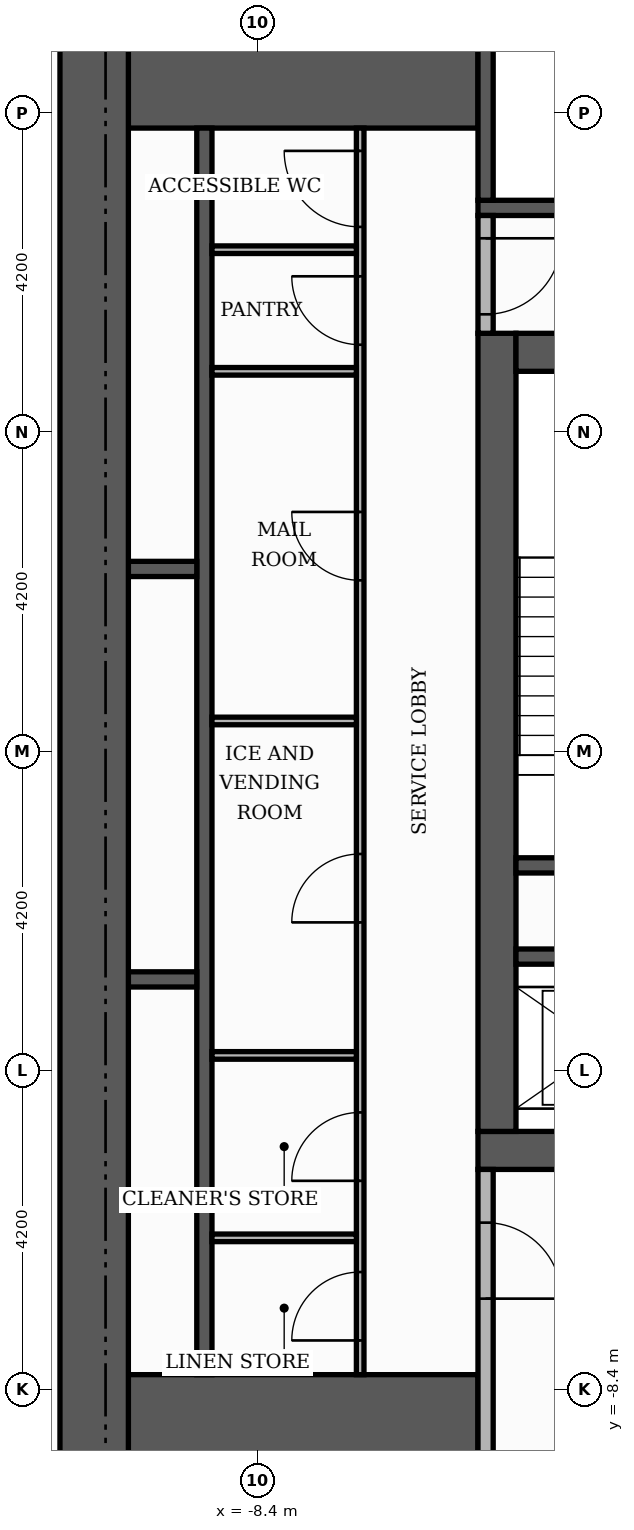
"""IFC4 building model, lengths in metres.
Left out: names, types, materials, properties, quantities, classifications, styles, units other than length and angle.
Written with IfcOpenShell. Run it as: python <this file> out.ifc"""

import sys

from ifc_helpers import new_model, si_unit, direction, frame, frame_2d, origin, place, context, subcontext, project, spatial, rectangle, extrude, element, fill, save


model = new_model("IFC4")
c1 = context("Model", 3, precision=1e-05, world=origin(), true_north=direction((0.0, 1.0)))
c2 = subcontext(c1, "Body", "Model", "MODEL_VIEW")
j1 = project(units=[si_unit("LENGTHUNIT", "METRE"), si_unit("PLANEANGLEUNIT", "RADIAN")], contexts=[c1])
p1 = place(None, origin())
s1 = spatial("IfcSite", under=j1, at=p1, CompositionType="ELEMENT")
p2 = place(p1, origin())
s2 = spatial("IfcBuilding", under=s1, at=p2, CompositionType="ELEMENT")
p3 = place(p2, frame((0.0, 0.0, 188.4)))
s3 = spatial("IfcBuildingStorey", under=s2, at=p3, CompositionType="ELEMENT", Elevation=188.4)
p4 = place(p3, frame((-5.5, -5.25, 0.0), z_axis=(0.0, 0.0, 1.0), x_axis=(1.0, 0.0, 0.0)))
e1 = element("IfcWall", 1, at=p4, inside=s3, PredefinedType="SHEAR", context=c2, shape_type="SweptSolid", body=[
    extrude(rectangle(XDim=11.0, YDim=0.5, at=frame_2d((5.5, 0.0))), origin(), (0.0, 0.0, 1.0), 3.48),
])
p5 = place(p4, frame((4.9, 0.0, 0.0)))
e2 = element("IfcOpeningElement", 2, at=p5, cuts=e1, PredefinedType="OPENING", context=c2, shape_type="SweptSolid", body=[
    extrude(rectangle(XDim=1.2, YDim=2.1, at=frame_2d((0.6, 1.05))), frame((0.0, 0.26, 0.0), z_axis=(0.0, -1.0, 0.0), x_axis=(1.0, 0.0, 0.0)), (0.0, 0.0, 1.0), 0.52),
])
p6 = place(p3, frame((-5.25, -5.0, 0.0), z_axis=(0.0, 0.0, 1.0), x_axis=(0.0, 1.0, 0.0)))
e3 = element("IfcWall", 3, at=p6, inside=s3, PredefinedType="SHEAR", context=c2, shape_type="SweptSolid", body=[
    extrude(rectangle(XDim=10.5, YDim=0.5, at=frame_2d((5.25, 0.0))), origin(), (0.0, 0.0, 1.0), 3.48),
])
p7 = place(p3, frame((-5.0, 5.25, 0.0), z_axis=(0.0, 0.0, 1.0), x_axis=(1.0, 0.0, 0.0)))
e4 = element("IfcWall", 4, at=p7, inside=s3, PredefinedType="SHEAR", context=c2, shape_type="SweptSolid", body=[
    extrude(rectangle(XDim=10.0, YDim=0.5, at=frame_2d((5.0, 0.0))), origin(), (0.0, 0.0, 1.0), 3.48),
])
p8 = place(p7, frame((4.4, 0.0, 0.0)))
e5 = element("IfcOpeningElement", 5, at=p8, cuts=e4, PredefinedType="OPENING", context=c2, shape_type="SweptSolid", body=[
    extrude(rectangle(XDim=1.2, YDim=2.1, at=frame_2d((0.6, 1.05))), frame((0.0, 0.26, 0.0), z_axis=(0.0, -1.0, 0.0), x_axis=(1.0, 0.0, 0.0)), (0.0, 0.0, 1.0), 0.52),
])
for number, where, z_axis, x_axis in (
    (6, (-10.1, -9.15, 0.0), (0.0, 0.0, 1.0), (1.0, 0.0, 0.0)),
    (7, (-10.1, 9.15, 0.0), (0.0, 0.0, 1.0), (1.0, 0.0, 0.0)),
):
    element("IfcWall", number, at=place(p3, frame(where, z_axis=z_axis, x_axis=x_axis)), inside=s3, PredefinedType="SHEAR", context=c2, shape_type="SweptSolid", body=[
        extrude(rectangle(XDim=4.6, YDim=1.9, at=frame_2d((2.3, 0.0))), origin(), (0.0, 0.0, 1.0), 3.48),
    ])
p9 = place(p3, frame((-5.0, -1.5, 0.0), z_axis=(0.0, 0.0, 1.0), x_axis=(1.0, 0.0, 0.0)))
e8 = element("IfcWall", 8, at=p9, inside=s3, PredefinedType="SHEAR", context=c2, shape_type="SweptSolid", body=[
    extrude(rectangle(XDim=3.05, YDim=0.2, at=frame_2d((1.525, 0.0))), origin(), (0.0, 0.0, 1.0), 3.48),
])
p10 = place(p3, frame((-5.5, 7.15, 0.0), z_axis=(0.0, 0.0, 1.0), x_axis=(1.0, 0.0, 0.0)))
e9 = element("IfcWall", 9, at=p10, inside=s3, PredefinedType="SHEAR", context=c2, shape_type="SweptSolid", body=[
    extrude(rectangle(XDim=6.8, YDim=0.2, at=frame_2d((3.4, 0.0))), origin(), (0.0, 0.0, 1.0), 3.48),
])
p11 = place(p3, frame((-5.4, 7.25, 0.0), z_axis=(0.0, 0.0, 1.0), x_axis=(0.0, 1.0, 0.0)))
e10 = element("IfcWall", 10, at=p11, inside=s3, PredefinedType="SHEAR", context=c2, shape_type="SweptSolid", body=[
    extrude(rectangle(XDim=2.85, YDim=0.2, at=frame_2d((1.425, 0.0))), origin(), (0.0, 0.0, 1.0), 3.48),
])
p12 = place(p3, frame((-9.1, -8.2, 0.0), z_axis=(0.0, 0.0, 1.0), x_axis=(0.0, 1.0, 0.0)))
e11 = element("IfcWall", 11, at=p12, inside=s3, PredefinedType="SHEAR", context=c2, shape_type="SweptSolid", body=[
    extrude(rectangle(XDim=16.4, YDim=0.2, at=frame_2d((8.2, 0.0))), origin(), (0.0, 0.0, 1.0), 3.48),
])
p13 = place(p3, frame((-10.1, -3.0, 0.0), z_axis=(0.0, 0.0, 1.0), x_axis=(1.0, 0.0, 0.0)))
e12 = element("IfcWall", 12, at=p13, inside=s3, PredefinedType="SHEAR", context=c2, shape_type="SweptSolid", body=[
    extrude(rectangle(XDim=0.9, YDim=0.2, at=frame_2d((0.45, 0.0))), origin(), (0.0, 0.0, 1.0), 3.48),
])
p14 = place(p3, frame((-5.0, -2.7, 0.0), z_axis=(0.0, 0.0, 1.0), x_axis=(1.0, 0.0, 0.0)))
e13 = element("IfcWall", 13, at=p14, inside=s3, PredefinedType="SHEAR", context=c2, shape_type="SweptSolid", body=[
    extrude(rectangle(XDim=2.85, YDim=0.2, at=frame_2d((1.425, 0.0))), origin(), (0.0, 0.0, 1.0), 3.48),
])
p15 = place(p3, frame((-10.1, 2.4, 0.0), z_axis=(0.0, 0.0, 1.0), x_axis=(1.0, 0.0, 0.0)))
e14 = element("IfcWall", 14, at=p15, inside=s3, PredefinedType="SHEAR", context=c2, shape_type="SweptSolid", body=[
    extrude(rectangle(XDim=0.9, YDim=0.2, at=frame_2d((0.45, 0.0))), origin(), (0.0, 0.0, 1.0), 3.48),
])
p16 = place(p3, frame((-10.55, -10.1, 0.0), z_axis=(0.0, 0.0, 1.0), x_axis=(0.0, 1.0, 0.0)))
e15 = element("IfcWall", 15, at=p16, inside=s3, PredefinedType="SHEAR", context=c2, shape_type="SweptSolid", body=[
    extrude(rectangle(XDim=20.2, YDim=0.9, at=frame_2d((10.1, 0.0))), origin(), (0.0, 0.0, 1.0), 3.48),
])
p17 = place(p3, frame((-5.4, -10.1, 0.0), z_axis=(0.0, 0.0, 1.0), x_axis=(0.0, 1.0, 0.0)))
e16 = element("IfcWall", 16, at=p17, inside=s3, PredefinedType="PARTITIONING", context=c2, shape_type="SweptSolid", body=[
    extrude(rectangle(XDim=4.6, YDim=0.2, at=frame_2d((2.3, 0.0))), origin(), (0.0, 0.0, 1.0), 3.48),
])
p18 = place(p17, frame((2.9, 0.0, 0.0)))
e17 = element("IfcOpeningElement", 17, at=p18, cuts=e16, PredefinedType="OPENING", context=c2, shape_type="SweptSolid", body=[
    extrude(rectangle(XDim=1.0, YDim=2.1, at=frame_2d((0.5, 1.05))), frame((0.0, 0.11, 0.0), z_axis=(0.0, -1.0, 0.0), x_axis=(1.0, 0.0, 0.0)), (0.0, 0.0, 1.0), 0.22),
])
p19 = place(p3, frame((-7.05, -8.2, 0.0), z_axis=(0.0, 0.0, 1.0), x_axis=(0.0, 1.0, 0.0)))
e18 = element("IfcWall", 18, at=p19, inside=s3, PredefinedType="PARTITIONING", context=c2, shape_type="SweptSolid", body=[
    extrude(rectangle(XDim=16.4, YDim=0.1, at=frame_2d((8.2, 0.0))), origin(), (0.0, 0.0, 1.0), 3.48),
])
p20 = place(p19, frame((0.45, 0.0, 0.0)))
e19 = element("IfcOpeningElement", 19, at=p20, cuts=e18, PredefinedType="OPENING", context=c2, shape_type="SweptSolid", body=[
    extrude(rectangle(XDim=0.9, YDim=2.1, at=frame_2d((0.45, 1.05))), frame((0.0, 0.06, 0.0), z_axis=(0.0, -1.0, 0.0), x_axis=(1.0, 0.0, 0.0)), (0.0, 0.0, 1.0), 0.12),
])
p21 = place(p19, frame((2.55, 0.0, 0.0)))
e20 = element("IfcOpeningElement", 20, at=p21, cuts=e18, PredefinedType="OPENING", context=c2, shape_type="SweptSolid", body=[
    extrude(rectangle(XDim=0.9, YDim=2.1, at=frame_2d((0.45, 1.05))), frame((0.0, 0.06, 0.0), z_axis=(0.0, -1.0, 0.0), x_axis=(1.0, 0.0, 0.0)), (0.0, 0.0, 1.0), 0.12),
])
p22 = place(p19, frame((5.95, 0.0, 0.0)))
e21 = element("IfcOpeningElement", 21, at=p22, cuts=e18, PredefinedType="OPENING", context=c2, shape_type="SweptSolid", body=[
    extrude(rectangle(XDim=0.9, YDim=2.1, at=frame_2d((0.45, 1.05))), frame((0.0, 0.06, 0.0), z_axis=(0.0, -1.0, 0.0), x_axis=(1.0, 0.0, 0.0)), (0.0, 0.0, 1.0), 0.12),
])
p23 = place(p19, frame((10.45, 0.0, 0.0)))
e22 = element("IfcOpeningElement", 22, at=p23, cuts=e18, PredefinedType="OPENING", context=c2, shape_type="SweptSolid", body=[
    extrude(rectangle(XDim=0.9, YDim=2.1, at=frame_2d((0.45, 1.05))), frame((0.0, 0.06, 0.0), z_axis=(0.0, -1.0, 0.0), x_axis=(1.0, 0.0, 0.0)), (0.0, 0.0, 1.0), 0.12),
])
p24 = place(p19, frame((13.55, 0.0, 0.0)))
e23 = element("IfcOpeningElement", 23, at=p24, cuts=e18, PredefinedType="OPENING", context=c2, shape_type="SweptSolid", body=[
    extrude(rectangle(XDim=0.9, YDim=2.1, at=frame_2d((0.45, 1.05))), frame((0.0, 0.06, 0.0), z_axis=(0.0, -1.0, 0.0), x_axis=(1.0, 0.0, 0.0)), (0.0, 0.0, 1.0), 0.12),
])
p25 = place(p19, frame((15.1, 0.0, 0.0)))
e24 = element("IfcOpeningElement", 24, at=p25, cuts=e18, PredefinedType="OPENING", context=c2, shape_type="SweptSolid", body=[
    extrude(rectangle(XDim=1.0, YDim=2.1, at=frame_2d((0.5, 1.05))), frame((0.0, 0.06, 0.0), z_axis=(0.0, -1.0, 0.0), x_axis=(1.0, 0.0, 0.0)), (0.0, 0.0, 1.0), 0.12),
])
for number, where, z_axis, x_axis in (
    (25, (-9.0, -6.4, 0.0), (0.0, 0.0, 1.0), (1.0, 0.0, 0.0)),
    (26, (-9.0, -4.0, 0.0), (0.0, 0.0, 1.0), (1.0, 0.0, 0.0)),
    (27, (-9.0, 0.4, 0.0), (0.0, 0.0, 1.0), (1.0, 0.0, 0.0)),
    (28, (-9.0, 5.0, 0.0), (0.0, 0.0, 1.0), (1.0, 0.0, 0.0)),
):
    element("IfcWall", number, at=place(p3, frame(where, z_axis=z_axis, x_axis=x_axis)), inside=s3, PredefinedType="PARTITIONING", context=c2, shape_type="SweptSolid", body=[
        extrude(rectangle(XDim=1.9, YDim=0.1, at=frame_2d((0.95, 0.0))), origin(), (0.0, 0.0, 1.0), 3.48),
    ])
p26 = place(p3, frame((-5.4, 5.5, 0.0), z_axis=(0.0, 0.0, 1.0), x_axis=(0.0, 1.0, 0.0)))
e29 = element("IfcWall", 29, at=p26, inside=s3, PredefinedType="PARTITIONING", context=c2, shape_type="SweptSolid", body=[
    extrude(rectangle(XDim=1.55, YDim=0.2, at=frame_2d((0.775, 0.0))), origin(), (0.0, 0.0, 1.0), 3.48),
])
p27 = place(p26, frame((0.25, 0.0, 0.0)))
e30 = element("IfcOpeningElement", 30, at=p27, cuts=e29, PredefinedType="OPENING", context=c2, shape_type="SweptSolid", body=[
    extrude(rectangle(XDim=1.0, YDim=2.1, at=frame_2d((0.5, 1.05))), frame((0.0, 0.11, 0.0), z_axis=(0.0, -1.0, 0.0), x_axis=(1.0, 0.0, 0.0)), (0.0, 0.0, 1.0), 0.22),
])
p28 = place(p3, frame((-9.0, 6.6, 0.0), z_axis=(0.0, 0.0, 1.0), x_axis=(1.0, 0.0, 0.0)))
e31 = element("IfcWall", 31, at=p28, inside=s3, PredefinedType="PARTITIONING", context=c2, shape_type="SweptSolid", body=[
    extrude(rectangle(XDim=1.9, YDim=0.1, at=frame_2d((0.95, 0.0))), origin(), (0.0, 0.0, 1.0), 3.48),
])
p29 = place(p27, frame((1.0, 0.0, 0.0), z_axis=(0.0, 0.0, 1.0), x_axis=(-1.0, 0.0, 0.0)))
e32 = element("IfcDoor", 32, at=p29, inside=s3, OperationType="SINGLE_SWING_RIGHT", PredefinedType="DOOR", context=c2, shape_type="SweptSolid", body=[
    extrude(rectangle(XDim=1.0, YDim=2.1, at=frame_2d((0.5, 1.05))), frame((0.0, 0.025, 0.0), z_axis=(0.0, -1.0, 0.0), x_axis=(1.0, 0.0, 0.0)), (0.0, 0.0, 1.0), 0.05),
])
fill(e30, e32)
p30 = place(p18, frame((1.0, 0.0, 0.0), z_axis=(0.0, 0.0, 1.0), x_axis=(-1.0, 0.0, 0.0)))
e33 = element("IfcDoor", 33, at=p30, inside=s3, OperationType="SINGLE_SWING_LEFT", PredefinedType="DOOR", context=c2, shape_type="SweptSolid", body=[
    extrude(rectangle(XDim=1.0, YDim=2.1, at=frame_2d((0.5, 1.05))), frame((0.0, 0.025, 0.0), z_axis=(0.0, -1.0, 0.0), x_axis=(1.0, 0.0, 0.0)), (0.0, 0.0, 1.0), 0.05),
])
fill(e17, e33)
p31 = place(p20, origin())
e34 = element("IfcDoor", 34, at=p31, inside=s3, OperationType="SINGLE_SWING_LEFT", PredefinedType="DOOR", context=c2, shape_type="SweptSolid", body=[
    extrude(rectangle(XDim=0.9, YDim=2.1, at=frame_2d((0.45, 1.05))), frame((0.0, 0.025, 0.0), z_axis=(0.0, -1.0, 0.0), x_axis=(1.0, 0.0, 0.0)), (0.0, 0.0, 1.0), 0.05),
])
fill(e19, e34)
p32 = place(p21, origin())
e35 = element("IfcDoor", 35, at=p32, inside=s3, OperationType="SINGLE_SWING_LEFT", PredefinedType="DOOR", context=c2, shape_type="SweptSolid", body=[
    extrude(rectangle(XDim=0.9, YDim=2.1, at=frame_2d((0.45, 1.05))), frame((0.0, 0.025, 0.0), z_axis=(0.0, -1.0, 0.0), x_axis=(1.0, 0.0, 0.0)), (0.0, 0.0, 1.0), 0.05),
])
fill(e20, e35)
p33 = place(p22, origin())
e36 = element("IfcDoor", 36, at=p33, inside=s3, OperationType="SINGLE_SWING_LEFT", PredefinedType="DOOR", context=c2, shape_type="SweptSolid", body=[
    extrude(rectangle(XDim=0.9, YDim=2.1, at=frame_2d((0.45, 1.05))), frame((0.0, 0.025, 0.0), z_axis=(0.0, -1.0, 0.0), x_axis=(1.0, 0.0, 0.0)), (0.0, 0.0, 1.0), 0.05),
])
fill(e21, e36)
p34 = place(p23, origin())
e37 = element("IfcDoor", 37, at=p34, inside=s3, OperationType="SINGLE_SWING_RIGHT", PredefinedType="DOOR", context=c2, shape_type="SweptSolid", body=[
    extrude(rectangle(XDim=0.9, YDim=2.1, at=frame_2d((0.45, 1.05))), frame((0.0, 0.025, 0.0), z_axis=(0.0, -1.0, 0.0), x_axis=(1.0, 0.0, 0.0)), (0.0, 0.0, 1.0), 0.05),
])
fill(e22, e37)
p35 = place(p24, origin())
e38 = element("IfcDoor", 38, at=p35, inside=s3, OperationType="SINGLE_SWING_RIGHT", PredefinedType="DOOR", context=c2, shape_type="SweptSolid", body=[
    extrude(rectangle(XDim=0.9, YDim=2.1, at=frame_2d((0.45, 1.05))), frame((0.0, 0.025, 0.0), z_axis=(0.0, -1.0, 0.0), x_axis=(1.0, 0.0, 0.0)), (0.0, 0.0, 1.0), 0.05),
])
fill(e23, e38)
p36 = place(p25, origin())
e39 = element("IfcDoor", 39, at=p36, inside=s3, OperationType="SINGLE_SWING_RIGHT", PredefinedType="DOOR", context=c2, shape_type="SweptSolid", body=[
    extrude(rectangle(XDim=1.0, YDim=2.1, at=frame_2d((0.5, 1.05))), frame((0.0, 0.025, 0.0), z_axis=(0.0, -1.0, 0.0), x_axis=(1.0, 0.0, 0.0)), (0.0, 0.0, 1.0), 0.05),
])
fill(e24, e39)
save(model, sys.argv[1])
